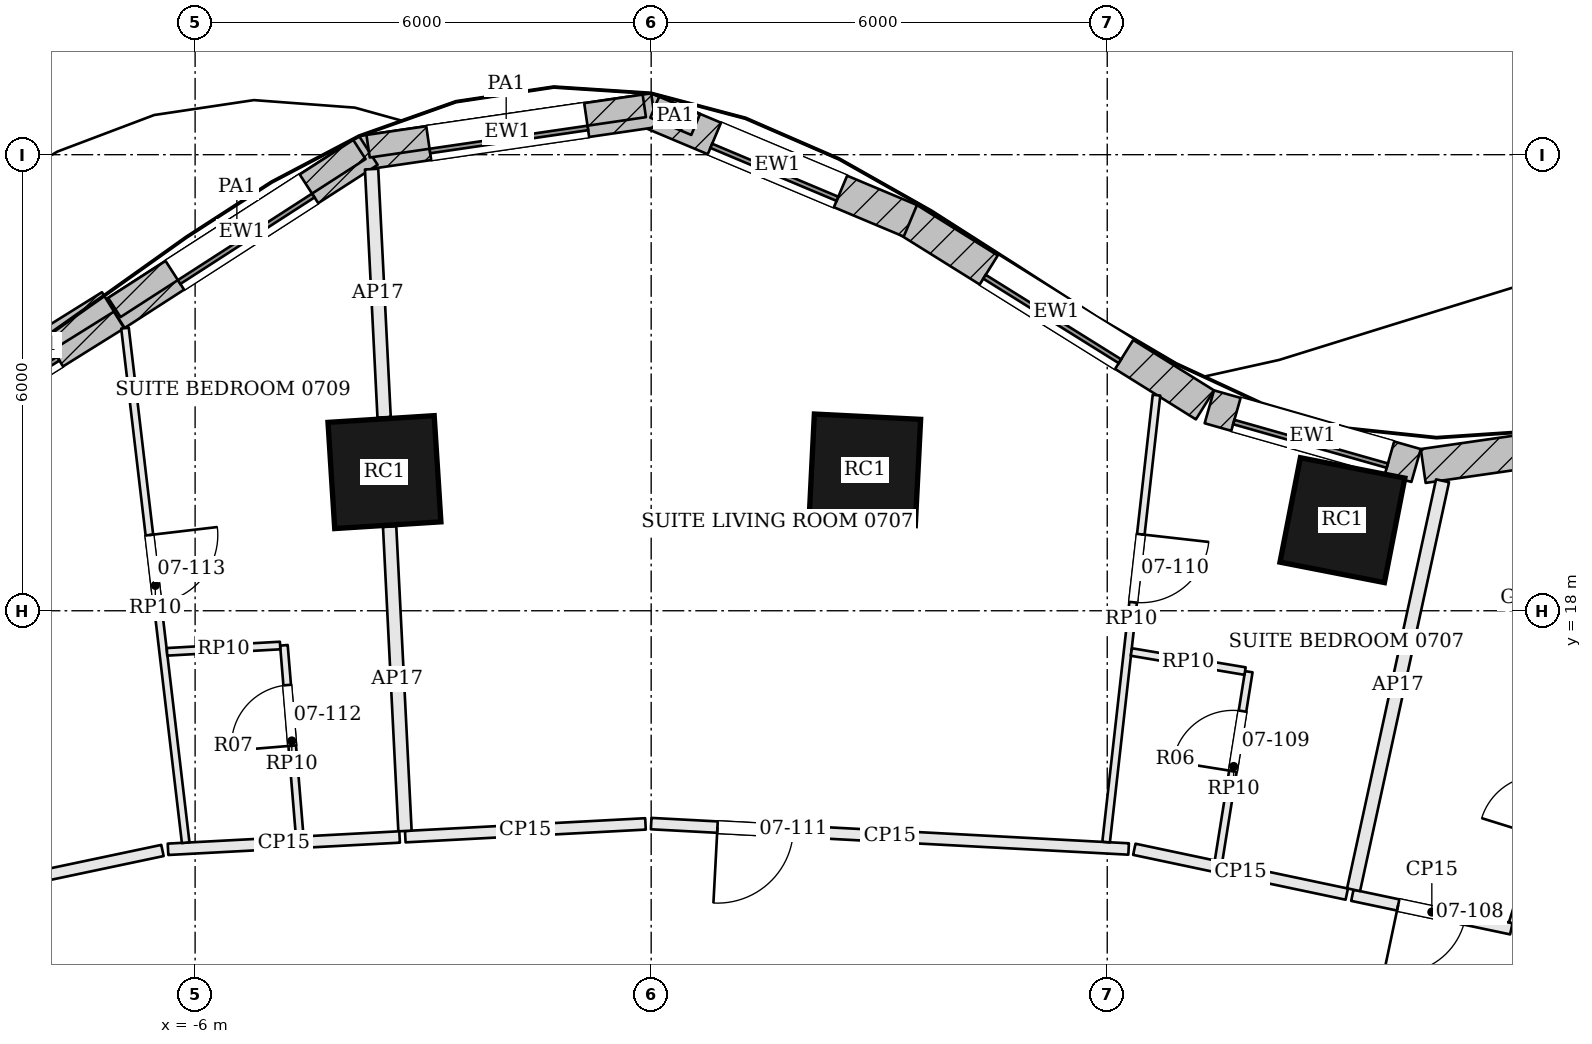
"""IFC4 building model, lengths in metres.
Left out: names, types, materials, properties, quantities, classifications, styles, units other than length and angle.
Written with IfcOpenShell. Run it as: python <this file> out.ifc"""

import sys

from ifc_helpers import new_model, si_unit, direction, frame, frame_2d, origin, origin_2d, place, context, subcontext, project, spatial, rectangle, extrude, element, fill, save


model = new_model("IFC4")
c1 = context("Model", 3, precision=1e-05, world=origin(), true_north=direction((0.0, 1.0)))
c2 = subcontext(c1, "Body", "Model", "MODEL_VIEW")
j1 = project(units=[si_unit("LENGTHUNIT", "METRE"), si_unit("PLANEANGLEUNIT", "RADIAN")], contexts=[c1])
p1 = place(None, origin())
s1 = spatial("IfcSite", under=j1, at=p1, CompositionType="ELEMENT")
p2 = place(p1, origin())
s2 = spatial("IfcBuilding", under=s1, at=p2, CompositionType="ELEMENT")
p3 = place(p2, frame((0.0, 0.0, 41.1)))
s3 = spatial("IfcBuildingStorey", under=s2, at=p3, CompositionType="ELEMENT", Elevation=41.1)
for number, where, z_axis, x_axis in (
    (1, (9.094, 19.192, 0.0), (0.0, 0.0, 1.0), (-0.981, 0.192, 0.0)),
    (2, (2.811, 19.854, 0.0), (0.0, 0.0, 1.0), (-0.999, 0.05, 0.0)),
    (3, (-3.509, 19.824, 0.0), (0.0, 0.0, 1.0), (-0.998, -0.063, 0.0)),
):
    element("IfcColumn", number, at=place(p3, frame(where, z_axis=z_axis, x_axis=x_axis)), inside=s3, PredefinedType="COLUMN", context=c2, shape_type="SweptSolid", body=[
        extrude(rectangle(XDim=1.4, YDim=1.4, at=origin_2d()), origin(), (0.0, 0.0, 1.0), 3.6),
    ])
p4 = place(p3, frame((15.752, 20.711, 0.0), z_axis=(0.0, 0.0, 1.0), x_axis=(-0.989761192351, -0.142733255115, 0.0)))
e4 = element("IfcWall", 4, at=p4, inside=s3, PredefinedType="SOLIDWALL", context=c2, shape_type="SweptSolid", body=[
    extrude(rectangle(XDim=5.653, YDim=0.45, at=frame_2d((2.827, 0.0))), origin(), (0.0, 0.0, 1.0), 3.4),
])
p5 = place(p4, frame((1.777, 0.0, 0.9)))
e5 = element("IfcOpeningElement", 5, at=p5, cuts=e4, PredefinedType="OPENING", context=c2, shape_type="SweptSolid", body=[
    extrude(rectangle(XDim=2.1, YDim=2.0, at=frame_2d((1.05, 1.0))), frame((0.0, 0.235, 0.0), z_axis=(0.0, -1.0, 0.0), x_axis=(1.0, 0.0, 0.0)), (0.0, 0.0, 1.0), 0.47),
])
p6 = place(p3, frame((10.063, 19.911, 0.0), z_axis=(0.0, 0.0, 1.0), x_axis=(-0.961982029567, 0.273112751057, 0.0)))
e6 = element("IfcWall", 6, at=p6, inside=s3, PredefinedType="SOLIDWALL", context=c2, shape_type="SweptSolid", body=[
    extrude(rectangle(XDim=2.827, YDim=0.45, at=frame_2d((1.414, 0.0))), origin(), (0.0, 0.0, 1.0), 3.4),
])
p7 = place(p6, frame((0.364, 0.0, 0.9)))
e7 = element("IfcOpeningElement", 7, at=p7, cuts=e6, PredefinedType="OPENING", context=c2, shape_type="SweptSolid", body=[
    extrude(rectangle(XDim=2.1, YDim=2.0, at=frame_2d((1.05, 1.0))), frame((0.0, 0.235, 0.0), z_axis=(0.0, -1.0, 0.0), x_axis=(1.0, 0.0, 0.0)), (0.0, 0.0, 1.0), 0.47),
])
p8 = place(p3, frame((7.286, 20.708, 0.0), z_axis=(0.0, 0.0, 1.0), x_axis=(-0.848420894374, 0.529322194878, 0.0)))
e8 = element("IfcWall", 8, at=p8, inside=s3, PredefinedType="SOLIDWALL", context=c2, shape_type="SweptSolid", body=[
    extrude(rectangle(XDim=4.606, YDim=0.45, at=frame_2d((2.303, 0.0))), origin(), (0.0, 0.0, 1.0), 3.4),
])
p9 = place(p8, frame((1.253, 0.0, 0.9)))
e9 = element("IfcOpeningElement", 9, at=p9, cuts=e8, PredefinedType="OPENING", context=c2, shape_type="SweptSolid", body=[
    extrude(rectangle(XDim=2.1, YDim=2.0, at=frame_2d((1.05, 1.0))), frame((0.0, 0.235, 0.0), z_axis=(0.0, -1.0, 0.0), x_axis=(1.0, 0.0, 0.0)), (0.0, 0.0, 1.0), 0.47),
])
p10 = place(p3, frame((3.41, 23.13, 0.0), z_axis=(0.0, 0.0, 1.0), x_axis=(-0.921914994676, 0.387392233521, 0.0)))
e10 = element("IfcWall", 10, at=p10, inside=s3, PredefinedType="SOLIDWALL", context=c2, shape_type="SweptSolid", body=[
    extrude(rectangle(XDim=3.793, YDim=0.45, at=frame_2d((1.896, 0.0))), origin(), (0.0, 0.0, 1.0), 3.4),
])
p11 = place(p10, frame((0.997, 0.0, 0.9)))
e11 = element("IfcOpeningElement", 11, at=p11, cuts=e10, PredefinedType="OPENING", context=c2, shape_type="SweptSolid", body=[
    extrude(rectangle(XDim=1.8, YDim=2.0, at=frame_2d((0.9, 1.0))), frame((0.0, 0.235, 0.0), z_axis=(0.0, -1.0, 0.0), x_axis=(1.0, 0.0, 0.0)), (0.0, 0.0, 1.0), 0.47),
])
p12 = place(p3, frame((0.032, 24.584, 0.0), z_axis=(0.0, 0.0, 1.0), x_axis=(-0.989495330387, -0.144564833698, 0.0)))
e12 = element("IfcWall", 12, at=p12, inside=s3, PredefinedType="SOLIDWALL", context=c2, shape_type="SweptSolid", body=[
    extrude(rectangle(XDim=3.881, YDim=0.45, at=frame_2d((1.94, 0.0))), origin(), (0.0, 0.0, 1.0), 3.4),
])
p13 = place(p12, frame((0.89, 0.0, 0.9)))
e13 = element("IfcOpeningElement", 13, at=p13, cuts=e12, PredefinedType="OPENING", context=c2, shape_type="SweptSolid", body=[
    extrude(rectangle(XDim=2.1, YDim=2.0, at=frame_2d((1.05, 1.0))), frame((0.0, 0.235, 0.0), z_axis=(0.0, -1.0, 0.0), x_axis=(1.0, 0.0, 0.0)), (0.0, 0.0, 1.0), 0.47),
])
p14 = place(p3, frame((-3.721, 24.055, 0.0), z_axis=(0.0, 0.0, 1.0), x_axis=(-0.840404438766, -0.54195975801, 0.0)))
e14 = element("IfcWall", 14, at=p14, inside=s3, PredefinedType="SOLIDWALL", context=c2, shape_type="SweptSolid", body=[
    extrude(rectangle(XDim=3.96, YDim=0.45, at=frame_2d((1.98, 0.0))), origin(), (0.0, 0.0, 1.0), 3.4),
])
p15 = place(p14, frame((0.93, 0.0, 0.9)))
e15 = element("IfcOpeningElement", 15, at=p15, cuts=e14, PredefinedType="OPENING", context=c2, shape_type="SweptSolid", body=[
    extrude(rectangle(XDim=2.1, YDim=2.0, at=frame_2d((1.05, 1.0))), frame((0.0, 0.235, 0.0), z_axis=(0.0, -1.0, 0.0), x_axis=(1.0, 0.0, 0.0)), (0.0, 0.0, 1.0), 0.47),
])
p16 = place(p3, frame((-7.052, 21.907, 0.0), z_axis=(0.0, 0.0, 1.0), x_axis=(-0.848498976054, -0.529197021566, 0.0)))
e16 = element("IfcWall", 16, at=p16, inside=s3, PredefinedType="SOLIDWALL", context=c2, shape_type="SweptSolid", body=[
    extrude(rectangle(XDim=3.997, YDim=0.45, at=frame_2d((1.998, 0.0))), origin(), (0.0, 0.0, 1.0), 3.4),
])
p17 = place(p16, frame((0.948, 0.0, 0.9)))
e17 = element("IfcOpeningElement", 17, at=p17, cuts=e16, PredefinedType="OPENING", context=c2, shape_type="SweptSolid", body=[
    extrude(rectangle(XDim=2.1, YDim=2.0, at=frame_2d((1.05, 1.0))), frame((0.0, 0.235, 0.0), z_axis=(0.0, -1.0, 0.0), x_axis=(1.0, 0.0, 0.0)), (0.0, 0.0, 1.0), 0.47),
])
p18 = place(p3, frame((0.586, 24.398, 3.6), z_axis=(0.0, 0.0, 1.0), x_axis=(-0.921949320844, 0.387310534062, 0.0)))
e18 = element("IfcWall", 18, at=p18, inside=s3, PredefinedType="PARAPET", context=c2, shape_type="SweptSolid", body=[
    extrude(rectangle(XDim=0.585, YDim=0.3, at=frame_2d((0.292, 0.0))), origin(), (0.0, 0.0, 1.0), 1.1),
])
p19 = place(p3, frame((-0.091, 24.642, 3.6), z_axis=(0.0, 0.0, 1.0), x_axis=(-0.989499132051, -0.144538810259, 0.0)))
e19 = element("IfcWall", 19, at=p19, inside=s3, PredefinedType="PARAPET", context=c2, shape_type="SweptSolid", body=[
    extrude(rectangle(XDim=3.672, YDim=0.3, at=frame_2d((1.836, 0.0))), origin(), (0.0, 0.0, 1.0), 1.1),
])
p20 = place(p3, frame((-3.839, 24.068, 3.6), z_axis=(0.0, 0.0, 1.0), x_axis=(-0.84044157539, -0.541902166776, 0.0)))
e20 = element("IfcWall", 20, at=p20, inside=s3, PredefinedType="PARAPET", context=c2, shape_type="SweptSolid", body=[
    extrude(rectangle(XDim=3.836, YDim=0.3, at=frame_2d((1.918, 0.0))), origin(), (0.0, 0.0, 1.0), 1.1),
])
p21 = place(p3, frame((-7.146, 22.064, 3.6), z_axis=(0.0, 0.0, 1.0), x_axis=(-0.848488829337, -0.529213290168, 0.0)))
e21 = element("IfcWall", 21, at=p21, inside=s3, PredefinedType="PARAPET", context=c2, shape_type="SweptSolid", body=[
    extrude(rectangle(XDim=2.124, YDim=0.3, at=frame_2d((1.062, 0.0))), origin(), (0.0, 0.0, 1.0), 1.1),
])
p22 = place(p3, frame((11.316, 13.815, 0.0), z_axis=(0.0, 0.0, 1.0), x_axis=(-0.978461212154, 0.206430754275, 0.0)))
e22 = element("IfcWall", 22, at=p22, inside=s3, PredefinedType="PARTITIONING", context=c2, shape_type="SweptSolid", body=[
    extrude(rectangle(XDim=2.137, YDim=0.15, at=frame_2d((1.069, 0.0))), origin(), (0.0, 0.0, 1.0), 2.68),
])
p23 = place(p22, frame((0.621, 0.0, 0.0)))
e23 = element("IfcOpeningElement", 23, at=p23, cuts=e22, PredefinedType="OPENING", context=c2, shape_type="SweptSolid", body=[
    extrude(rectangle(XDim=0.9, YDim=2.4, at=frame_2d((0.45, 1.2))), frame((0.0, 0.085, 0.0), z_axis=(0.0, -1.0, 0.0), x_axis=(1.0, 0.0, 0.0)), (0.0, 0.0, 1.0), 0.17),
])
p24 = place(p3, frame((10.411, 19.71, 0.0), z_axis=(0.0, 0.0, 1.0), x_axis=(-0.212613726561, -0.977136327888, 0.0)))
e24 = element("IfcWall", 24, at=p24, inside=s3, PredefinedType="PARTITIONING", context=c2, shape_type="SweptSolid", body=[
    extrude(rectangle(XDim=5.506, YDim=0.175, at=frame_2d((2.753, 0.0))), origin(), (0.0, 0.0, 1.0), 2.68),
])
p25 = place(p3, frame((9.152, 14.272, 0.0), z_axis=(0.0, 0.0, 1.0), x_axis=(-0.978472647326, 0.206376545266, 0.0)))
e25 = element("IfcWall", 25, at=p25, inside=s3, PredefinedType="PARTITIONING", context=c2, shape_type="SweptSolid", body=[
    extrude(rectangle(XDim=2.857, YDim=0.15, at=frame_2d((1.428, 0.0))), origin(), (0.0, 0.0, 1.0), 2.68),
])
p26 = place(p3, frame((6.281, 14.866, 0.0), z_axis=(0.0, 0.0, 1.0), x_axis=(-0.998587429539, 0.053133281163, 0.0)))
e26 = element("IfcWall", 26, at=p26, inside=s3, PredefinedType="PARTITIONING", context=c2, shape_type="SweptSolid", body=[
    extrude(rectangle(XDim=6.29, YDim=0.15, at=frame_2d((3.145, 0.0))), origin(), (0.0, 0.0, 1.0), 2.68),
])
p27 = place(p26, frame((4.417, 0.0, 0.0)))
e27 = element("IfcOpeningElement", 27, at=p27, cuts=e26, PredefinedType="OPENING", context=c2, shape_type="SweptSolid", body=[
    extrude(rectangle(XDim=1.0, YDim=2.1, at=frame_2d((0.5, 1.05))), frame((0.0, 0.085, 0.0), z_axis=(0.0, -1.0, 0.0), x_axis=(1.0, 0.0, 0.0)), (0.0, 0.0, 1.0), 0.17),
])
p28 = place(p3, frame((-0.075, 15.196, 0.0), z_axis=(0.0, 0.0, 1.0), x_axis=(-0.998590416346, -0.053077117309, 0.0)))
e28 = element("IfcWall", 28, at=p28, inside=s3, PredefinedType="PARTITIONING", context=c2, shape_type="SweptSolid", body=[
    extrude(rectangle(XDim=3.165, YDim=0.15, at=frame_2d((1.582, 0.0))), origin(), (0.0, 0.0, 1.0), 2.68),
])
p29 = place(p3, frame((-3.678, 23.81, 0.0), z_axis=(0.0, 0.0, 1.0), x_axis=(0.050406902628, -0.998728764063, 0.0)))
e29 = element("IfcWall", 29, at=p29, inside=s3, PredefinedType="PARTITIONING", context=c2, shape_type="SweptSolid", body=[
    extrude(rectangle(XDim=3.269, YDim=0.175, at=frame_2d((1.635, 0.0))), origin(), (0.0, 0.0, 1.0), 2.68),
])
p30 = place(p3, frame((-3.441, 19.107, 0.0), z_axis=(0.0, 0.0, 1.0), x_axis=(0.050420513856, -0.998728076997, 0.0)))
e30 = element("IfcWall", 30, at=p30, inside=s3, PredefinedType="PARTITIONING", context=c2, shape_type="SweptSolid", body=[
    extrude(rectangle(XDim=4.009, YDim=0.175, at=frame_2d((2.005, 0.0))), origin(), (0.0, 0.0, 1.0), 2.68),
])
p31 = place(p3, frame((-3.31, 15.024, 0.0), z_axis=(0.0, 0.0, 1.0), x_axis=(-0.998591396637, -0.053058670938, 0.0)))
e31 = element("IfcWall", 31, at=p31, inside=s3, PredefinedType="PARTITIONING", context=c2, shape_type="SweptSolid", body=[
    extrude(rectangle(XDim=3.051, YDim=0.15, at=frame_2d((1.525, 0.0))), origin(), (0.0, 0.0, 1.0), 2.68),
])
p32 = place(p3, frame((-6.43, 14.846, 0.0), z_axis=(0.0, 0.0, 1.0), x_axis=(-0.978470502428, -0.206386714394, 0.0)))
e32 = element("IfcWall", 32, at=p32, inside=s3, PredefinedType="PARTITIONING", context=c2, shape_type="SweptSolid", body=[
    extrude(rectangle(XDim=5.069, YDim=0.15, at=frame_2d((2.534, 0.0))), origin(), (0.0, 0.0, 1.0), 2.68),
])
p33 = place(p3, frame((11.333, 13.888, 0.0), z_axis=(0.0, 0.0, 1.0), x_axis=(0.297311415603, 0.954780562303, 0.0)))
e33 = element("IfcWall", 33, at=p33, inside=s3, PredefinedType="PARTITIONING", context=c2, shape_type="SweptSolid", body=[
    extrude(rectangle(XDim=2.525, YDim=0.1, at=frame_2d((1.263, 0.0))), origin(), (0.0, 0.0, 1.0), 2.68),
])
p34 = place(p33, frame((1.2, 0.0, 0.0)))
e34 = element("IfcOpeningElement", 34, at=p34, cuts=e33, PredefinedType="OPENING", context=c2, shape_type="SweptSolid", body=[
    extrude(rectangle(XDim=0.8, YDim=2.1, at=frame_2d((0.4, 1.05))), frame((0.0, 0.06, 0.0), z_axis=(0.0, -1.0, 0.0), x_axis=(1.0, 0.0, 0.0)), (0.0, 0.0, 1.0), 0.12),
])
p35 = place(p3, frame((6.648, 20.836, 0.0), z_axis=(0.0, 0.0, 1.0), x_axis=(-0.112061643164, -0.993701256984, 0.0)))
e35 = element("IfcWall", 35, at=p35, inside=s3, PredefinedType="PARTITIONING", context=c2, shape_type="SweptSolid", body=[
    extrude(rectangle(XDim=5.917, YDim=0.1, at=frame_2d((2.958, 0.0))), origin(), (0.0, 0.0, 1.0), 2.68),
])
p36 = place(p35, frame((1.842, 0.0, 0.0)))
e36 = element("IfcOpeningElement", 36, at=p36, cuts=e35, PredefinedType="OPENING", context=c2, shape_type="SweptSolid", body=[
    extrude(rectangle(XDim=0.9, YDim=2.4, at=frame_2d((0.45, 1.2))), frame((0.0, 0.06, 0.0), z_axis=(0.0, -1.0, 0.0), x_axis=(1.0, 0.0, 0.0)), (0.0, 0.0, 1.0), 0.12),
])
p37 = place(p3, frame((7.464, 14.705, 0.0), z_axis=(0.0, 0.0, 1.0), x_axis=(0.157794407392, 0.987471986942, 0.0)))
e37 = element("IfcWall", 37, at=p37, inside=s3, PredefinedType="PARTITIONING", context=c2, shape_type="SweptSolid", body=[
    extrude(rectangle(XDim=2.525, YDim=0.1, at=frame_2d((1.263, 0.0))), origin(), (0.0, 0.0, 1.0), 2.68),
])
p38 = place(p37, frame((1.2, 0.0, 0.0)))
e38 = element("IfcOpeningElement", 38, at=p38, cuts=e37, PredefinedType="OPENING", context=c2, shape_type="SweptSolid", body=[
    extrude(rectangle(XDim=0.8, YDim=2.1, at=frame_2d((0.4, 1.05))), frame((0.0, 0.06, 0.0), z_axis=(0.0, -1.0, 0.0), x_axis=(1.0, 0.0, 0.0)), (0.0, 0.0, 1.0), 0.12),
])
p39 = place(p3, frame((7.813, 17.206, 0.0), z_axis=(0.0, 0.0, 1.0), x_axis=(-0.986210571652, 0.165495342419, 0.0)))
e39 = element("IfcWall", 39, at=p39, inside=s3, PredefinedType="PARTITIONING", context=c2, shape_type="SweptSolid", body=[
    extrude(rectangle(XDim=1.517, YDim=0.1, at=frame_2d((0.758, 0.0))), origin(), (0.0, 0.0, 1.0), 2.68),
])
p40 = place(p3, frame((-6.923, 21.718, 0.0), z_axis=(0.0, 0.0, 1.0), x_axis=(0.117163366321, -0.993112655036, 0.0)))
e40 = element("IfcWall", 40, at=p40, inside=s3, PredefinedType="PARTITIONING", context=c2, shape_type="SweptSolid", body=[
    extrude(rectangle(XDim=6.816, YDim=0.1, at=frame_2d((3.408, 0.0))), origin(), (0.0, 0.0, 1.0), 2.68),
])
p41 = place(p40, frame((2.741, 0.0, 0.0)))
e41 = element("IfcOpeningElement", 41, at=p41, cuts=e40, PredefinedType="OPENING", context=c2, shape_type="SweptSolid", body=[
    extrude(rectangle(XDim=0.9, YDim=2.4, at=frame_2d((0.45, 1.2))), frame((0.0, 0.06, 0.0), z_axis=(0.0, -1.0, 0.0), x_axis=(1.0, 0.0, 0.0)), (0.0, 0.0, 1.0), 0.12),
])
p42 = place(p3, frame((-4.624, 15.029, 0.0), z_axis=(0.0, 0.0, 1.0), x_axis=(-0.08247732406, 0.996592941484, 0.0)))
e42 = element("IfcWall", 42, at=p42, inside=s3, PredefinedType="PARTITIONING", context=c2, shape_type="SweptSolid", body=[
    extrude(rectangle(XDim=2.525, YDim=0.1, at=frame_2d((1.262, 0.0))), origin(), (0.0, 0.0, 1.0), 2.68),
])
p43 = place(p42, frame((1.2, 0.0, 0.0)))
e43 = element("IfcOpeningElement", 43, at=p43, cuts=e42, PredefinedType="OPENING", context=c2, shape_type="SweptSolid", body=[
    extrude(rectangle(XDim=0.8, YDim=2.1, at=frame_2d((0.4, 1.05))), frame((0.0, 0.06, 0.0), z_axis=(0.0, -1.0, 0.0), x_axis=(1.0, 0.0, 0.0)), (0.0, 0.0, 1.0), 0.12),
])
p44 = place(p3, frame((-4.882, 17.542, 0.0), z_axis=(0.0, 0.0, 1.0), x_axis=(-0.998448742198, -0.055678624298, 0.0)))
e44 = element("IfcWall", 44, at=p44, inside=s3, PredefinedType="PARTITIONING", context=c2, shape_type="SweptSolid", body=[
    extrude(rectangle(XDim=1.491, YDim=0.1, at=frame_2d((0.745, 0.0))), origin(), (0.0, 0.0, 1.0), 2.68),
])
p45 = place(p7, origin())
e45 = element("IfcWindow", 45, at=p45, inside=s3, PartitioningType="SINGLE_PANEL", PredefinedType="WINDOW", context=c2, shape_type="SweptSolid", body=[
    extrude(rectangle(XDim=2.1, YDim=2.0, at=frame_2d((1.05, 1.0))), frame((0.0, 0.135, 0.0), z_axis=(0.0, -1.0, 0.0), x_axis=(1.0, 0.0, 0.0)), (0.0, 0.0, 1.0), 0.06),
])
fill(e7, e45)
p46 = place(p9, origin())
e46 = element("IfcWindow", 46, at=p46, inside=s3, PartitioningType="SINGLE_PANEL", PredefinedType="WINDOW", context=c2, shape_type="SweptSolid", body=[
    extrude(rectangle(XDim=2.1, YDim=2.0, at=frame_2d((1.05, 1.0))), frame((0.0, 0.135, 0.0), z_axis=(0.0, -1.0, 0.0), x_axis=(1.0, 0.0, 0.0)), (0.0, 0.0, 1.0), 0.06),
])
fill(e9, e46)
p47 = place(p11, origin())
e47 = element("IfcWindow", 47, at=p47, inside=s3, PartitioningType="SINGLE_PANEL", PredefinedType="WINDOW", context=c2, shape_type="SweptSolid", body=[
    extrude(rectangle(XDim=1.8, YDim=2.0, at=frame_2d((0.9, 1.0))), frame((0.0, 0.135, 0.0), z_axis=(0.0, -1.0, 0.0), x_axis=(1.0, 0.0, 0.0)), (0.0, 0.0, 1.0), 0.06),
])
fill(e11, e47)
p48 = place(p13, origin())
e48 = element("IfcWindow", 48, at=p48, inside=s3, PartitioningType="SINGLE_PANEL", PredefinedType="WINDOW", context=c2, shape_type="SweptSolid", body=[
    extrude(rectangle(XDim=2.1, YDim=2.0, at=frame_2d((1.05, 1.0))), frame((0.0, 0.135, 0.0), z_axis=(0.0, -1.0, 0.0), x_axis=(1.0, 0.0, 0.0)), (0.0, 0.0, 1.0), 0.06),
])
fill(e13, e48)
p49 = place(p15, origin())
e49 = element("IfcWindow", 49, at=p49, inside=s3, PartitioningType="SINGLE_PANEL", PredefinedType="WINDOW", context=c2, shape_type="SweptSolid", body=[
    extrude(rectangle(XDim=2.1, YDim=2.0, at=frame_2d((1.05, 1.0))), frame((0.0, 0.135, 0.0), z_axis=(0.0, -1.0, 0.0), x_axis=(1.0, 0.0, 0.0)), (0.0, 0.0, 1.0), 0.06),
])
fill(e15, e49)
p50 = place(p17, origin())
e50 = element("IfcWindow", 50, at=p50, inside=s3, PartitioningType="SINGLE_PANEL", PredefinedType="WINDOW", context=c2, shape_type="SweptSolid", body=[
    extrude(rectangle(XDim=2.1, YDim=2.0, at=frame_2d((1.05, 1.0))), frame((0.0, 0.135, 0.0), z_axis=(0.0, -1.0, 0.0), x_axis=(1.0, 0.0, 0.0)), (0.0, 0.0, 1.0), 0.06),
])
fill(e17, e50)
p51 = place(p23, origin())
e51 = element("IfcDoor", 51, at=p51, inside=s3, OperationType="SINGLE_SWING_RIGHT", PredefinedType="DOOR", context=c2, shape_type="SweptSolid", body=[
    extrude(rectangle(XDim=0.9, YDim=2.4, at=frame_2d((0.45, 1.2))), frame((0.0, 0.025, 0.0), z_axis=(0.0, -1.0, 0.0), x_axis=(1.0, 0.0, 0.0)), (0.0, 0.0, 1.0), 0.05),
])
fill(e23, e51)
p52 = place(p38, origin())
e52 = element("IfcDoor", 52, at=p52, inside=s3, OperationType="SINGLE_SWING_LEFT", PredefinedType="DOOR", context=c2, shape_type="SweptSolid", body=[
    extrude(rectangle(XDim=0.8, YDim=2.1, at=frame_2d((0.4, 1.05))), frame((0.0, 0.025, 0.0), z_axis=(0.0, -1.0, 0.0), x_axis=(1.0, 0.0, 0.0)), (0.0, 0.0, 1.0), 0.05),
])
fill(e38, e52)
p53 = place(p36, origin())
e53 = element("IfcDoor", 53, at=p53, inside=s3, OperationType="SINGLE_SWING_LEFT", PredefinedType="DOOR", context=c2, shape_type="SweptSolid", body=[
    extrude(rectangle(XDim=0.9, YDim=2.4, at=frame_2d((0.45, 1.2))), frame((0.0, 0.025, 0.0), z_axis=(0.0, -1.0, 0.0), x_axis=(1.0, 0.0, 0.0)), (0.0, 0.0, 1.0), 0.05),
])
fill(e36, e53)
p54 = place(p27, origin())
e54 = element("IfcDoor", 54, at=p54, inside=s3, OperationType="SINGLE_SWING_RIGHT", PredefinedType="DOOR", context=c2, shape_type="SweptSolid", body=[
    extrude(rectangle(XDim=1.0, YDim=2.1, at=frame_2d((0.5, 1.05))), frame((0.0, 0.025, 0.0), z_axis=(0.0, -1.0, 0.0), x_axis=(1.0, 0.0, 0.0)), (0.0, 0.0, 1.0), 0.05),
])
fill(e27, e54)
p55 = place(p43, origin())
e55 = element("IfcDoor", 55, at=p55, inside=s3, OperationType="SINGLE_SWING_LEFT", PredefinedType="DOOR", context=c2, shape_type="SweptSolid", body=[
    extrude(rectangle(XDim=0.8, YDim=2.1, at=frame_2d((0.4, 1.05))), frame((0.0, 0.025, 0.0), z_axis=(0.0, -1.0, 0.0), x_axis=(1.0, 0.0, 0.0)), (0.0, 0.0, 1.0), 0.05),
])
fill(e43, e55)
p56 = place(p41, origin())
e56 = element("IfcDoor", 56, at=p56, inside=s3, OperationType="SINGLE_SWING_LEFT", PredefinedType="DOOR", context=c2, shape_type="SweptSolid", body=[
    extrude(rectangle(XDim=0.9, YDim=2.4, at=frame_2d((0.45, 1.2))), frame((0.0, 0.025, 0.0), z_axis=(0.0, -1.0, 0.0), x_axis=(1.0, 0.0, 0.0)), (0.0, 0.0, 1.0), 0.05),
])
fill(e41, e56)
save(model, sys.argv[1])
